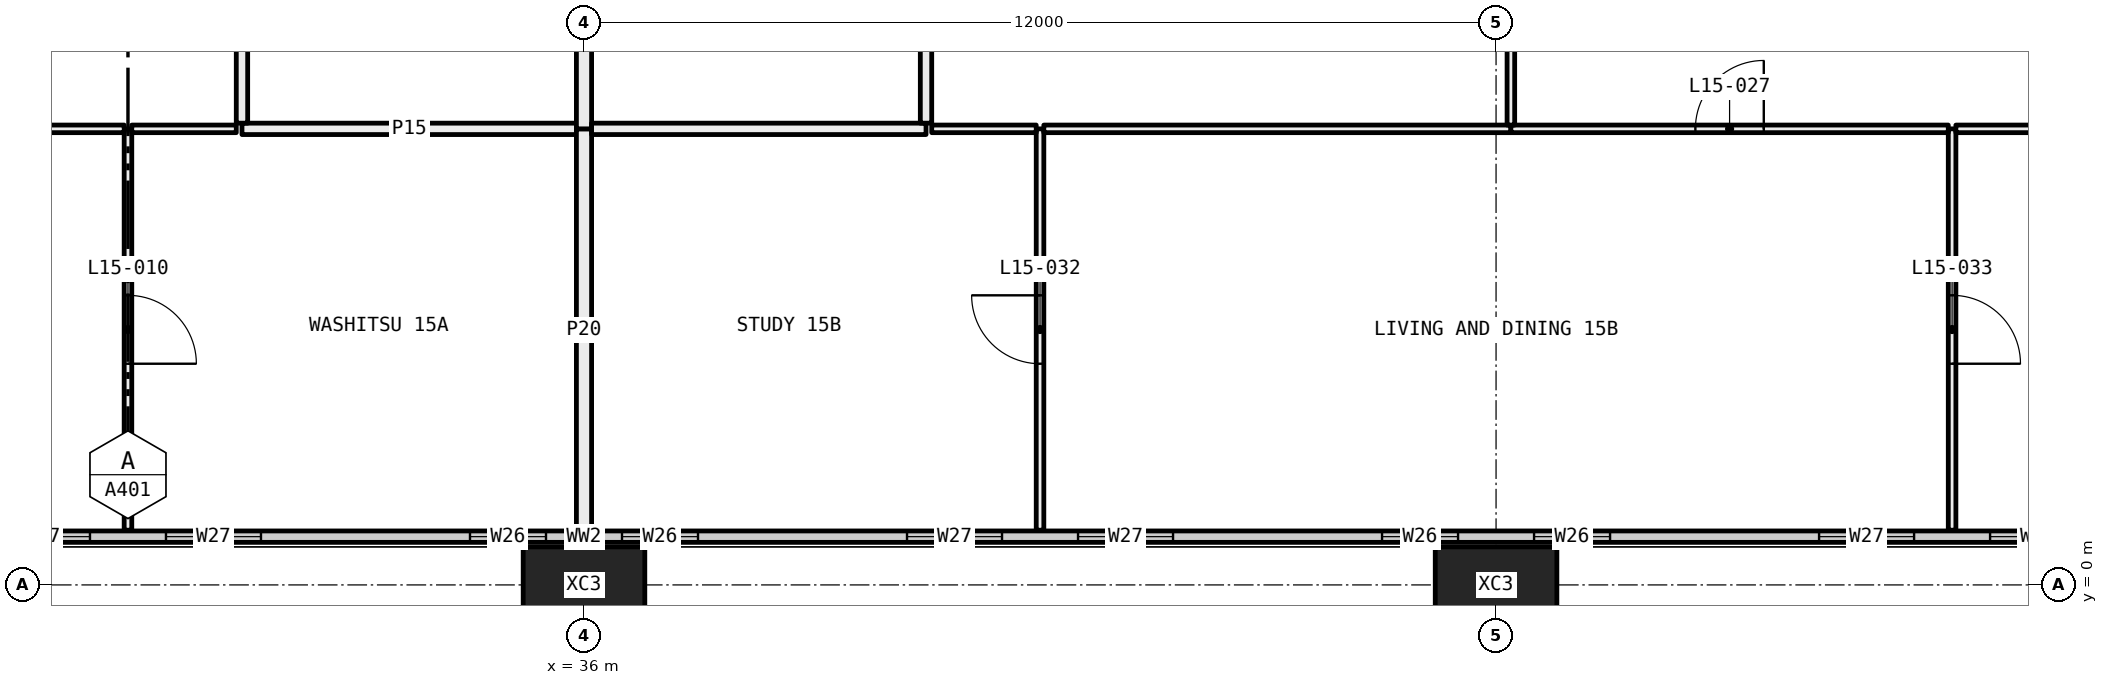
"""IFC4 building model, lengths in metres.
Left out: names, types, materials, properties, quantities, classifications, styles, units other than length and angle.
Written with IfcOpenShell. Run it as: python <this file> out.ifc"""

import sys

from ifc_helpers import new_model, si_unit, direction, frame, frame_2d, origin, origin_2d, place, context, subcontext, project, spatial, rectangle, hollow_rectangle, extrude, element, fill, save


model = new_model("IFC4")
c1 = context("Model", 3, precision=1e-05, world=origin(), true_north=direction((0.0, 1.0)))
c2 = subcontext(c1, "Body", "Model", "MODEL_VIEW")
j1 = project(units=[si_unit("LENGTHUNIT", "METRE"), si_unit("PLANEANGLEUNIT", "RADIAN")], contexts=[c1])
p1 = place(None, origin())
s1 = spatial("IfcSite", under=j1, at=p1, CompositionType="ELEMENT")
p2 = place(p1, origin())
s2 = spatial("IfcBuilding", under=s1, at=p2, CompositionType="ELEMENT")
p3 = place(p2, frame((0.0, 0.0, 64.5)))
s3 = spatial("IfcBuildingStorey", under=s2, at=p3, CompositionType="ELEMENT", Elevation=64.5)
for number, where, z_axis, x_axis in (
    (1, (36.0, 0.0, -0.4), (0.0, 0.0, 1.0), (1.0, 0.0, 0.0)),
    (2, (48.0, 0.0, -0.4), (0.0, 0.0, 1.0), (1.0, 0.0, 0.0)),
):
    element("IfcColumn", number, at=place(p3, frame(where, z_axis=z_axis, x_axis=x_axis)), inside=s3, PredefinedType="COLUMN", context=c2, shape_type="SweptSolid", body=[
        extrude(hollow_rectangle(XDim=1.6, YDim=1.0, WallThickness=0.065, at=origin_2d()), origin(), (0.0, 0.0, 1.0), 3.45),
    ])
p4 = place(p3, frame((6.56, 0.635, 0.0), z_axis=(0.0, 0.0, 1.0), x_axis=(1.0, 0.0, 0.0)))
e3 = element("IfcWall", 3, at=p4, inside=s3, PredefinedType="ELEMENTEDWALL", context=c2, shape_type="SweptSolid", body=[
    extrude(rectangle(XDim=58.88, YDim=0.15, at=frame_2d((29.44, 0.0))), origin(), (0.0, 0.0, 1.0), 3.05),
])
p5 = place(p4, frame((0.44, 0.0, 0.45)))
e4 = element("IfcOpeningElement", 4, at=p5, cuts=e3, PredefinedType="OPENING", context=c2, shape_type="SweptSolid", body=[
    extrude(rectangle(XDim=4.5, YDim=2.55, at=frame_2d((2.25, 1.275))), frame((0.0, 0.085, 0.0), z_axis=(0.0, -1.0, 0.0), x_axis=(1.0, 0.0, 0.0)), (0.0, 0.0, 1.0), 0.17),
])
p6 = place(p4, frame((5.94, 0.0, 0.45)))
e5 = element("IfcOpeningElement", 5, at=p6, cuts=e3, PredefinedType="OPENING", context=c2, shape_type="SweptSolid", body=[
    extrude(rectangle(XDim=1.0, YDim=2.55, at=frame_2d((0.5, 1.275))), frame((0.0, 0.085, 0.0), z_axis=(0.0, -1.0, 0.0), x_axis=(1.0, 0.0, 0.0)), (0.0, 0.0, 1.0), 0.17),
])
p7 = place(p4, frame((9.69, 0.0, 0.45)))
e6 = element("IfcOpeningElement", 6, at=p7, cuts=e3, PredefinedType="OPENING", context=c2, shape_type="SweptSolid", body=[
    extrude(rectangle(XDim=1.25, YDim=2.55, at=frame_2d((0.625, 1.275))), frame((0.0, 0.085, 0.0), z_axis=(0.0, -1.0, 0.0), x_axis=(1.0, 0.0, 0.0)), (0.0, 0.0, 1.0), 0.17),
])
p8 = place(p4, frame((11.94, 0.0, 0.45)))
e7 = element("IfcOpeningElement", 7, at=p8, cuts=e3, PredefinedType="OPENING", context=c2, shape_type="SweptSolid", body=[
    extrude(rectangle(XDim=1.25, YDim=2.55, at=frame_2d((0.625, 1.275))), frame((0.0, 0.085, 0.0), z_axis=(0.0, -1.0, 0.0), x_axis=(1.0, 0.0, 0.0)), (0.0, 0.0, 1.0), 0.17),
])
p9 = place(p4, frame((15.94, 0.0, 0.45)))
e8 = element("IfcOpeningElement", 8, at=p9, cuts=e3, PredefinedType="OPENING", context=c2, shape_type="SweptSolid", body=[
    extrude(rectangle(XDim=1.0, YDim=2.55, at=frame_2d((0.5, 1.275))), frame((0.0, 0.085, 0.0), z_axis=(0.0, -1.0, 0.0), x_axis=(1.0, 0.0, 0.0)), (0.0, 0.0, 1.0), 0.17),
])
p10 = place(p4, frame((17.94, 0.0, 0.45)))
e9 = element("IfcOpeningElement", 9, at=p10, cuts=e3, PredefinedType="OPENING", context=c2, shape_type="SweptSolid", body=[
    extrude(rectangle(XDim=1.0, YDim=2.55, at=frame_2d((0.5, 1.275))), frame((0.0, 0.085, 0.0), z_axis=(0.0, -1.0, 0.0), x_axis=(1.0, 0.0, 0.0)), (0.0, 0.0, 1.0), 0.17),
])
p11 = place(p4, frame((21.69, 0.0, 0.45)))
e10 = element("IfcOpeningElement", 10, at=p11, cuts=e3, PredefinedType="OPENING", context=c2, shape_type="SweptSolid", body=[
    extrude(rectangle(XDim=1.25, YDim=2.55, at=frame_2d((0.625, 1.275))), frame((0.0, 0.085, 0.0), z_axis=(0.0, -1.0, 0.0), x_axis=(1.0, 0.0, 0.0)), (0.0, 0.0, 1.0), 0.17),
])
p12 = place(p4, frame((23.94, 0.0, 0.45)))
e11 = element("IfcOpeningElement", 11, at=p12, cuts=e3, PredefinedType="OPENING", context=c2, shape_type="SweptSolid", body=[
    extrude(rectangle(XDim=1.25, YDim=2.55, at=frame_2d((0.625, 1.275))), frame((0.0, 0.085, 0.0), z_axis=(0.0, -1.0, 0.0), x_axis=(1.0, 0.0, 0.0)), (0.0, 0.0, 1.0), 0.17),
])
p13 = place(p4, frame((27.94, 0.0, 0.45)))
e12 = element("IfcOpeningElement", 12, at=p13, cuts=e3, PredefinedType="OPENING", context=c2, shape_type="SweptSolid", body=[
    extrude(rectangle(XDim=1.0, YDim=2.55, at=frame_2d((0.5, 1.275))), frame((0.0, 0.085, 0.0), z_axis=(0.0, -1.0, 0.0), x_axis=(1.0, 0.0, 0.0)), (0.0, 0.0, 1.0), 0.17),
])
p14 = place(p4, frame((29.94, 0.0, 0.45)))
e13 = element("IfcOpeningElement", 13, at=p14, cuts=e3, PredefinedType="OPENING", context=c2, shape_type="SweptSolid", body=[
    extrude(rectangle(XDim=1.0, YDim=2.55, at=frame_2d((0.5, 1.275))), frame((0.0, 0.085, 0.0), z_axis=(0.0, -1.0, 0.0), x_axis=(1.0, 0.0, 0.0)), (0.0, 0.0, 1.0), 0.17),
])
p15 = place(p4, frame((33.69, 0.0, 0.45)))
e14 = element("IfcOpeningElement", 14, at=p15, cuts=e3, PredefinedType="OPENING", context=c2, shape_type="SweptSolid", body=[
    extrude(rectangle(XDim=1.25, YDim=2.55, at=frame_2d((0.625, 1.275))), frame((0.0, 0.085, 0.0), z_axis=(0.0, -1.0, 0.0), x_axis=(1.0, 0.0, 0.0)), (0.0, 0.0, 1.0), 0.17),
])
p16 = place(p4, frame((35.94, 0.0, 0.45)))
e15 = element("IfcOpeningElement", 15, at=p16, cuts=e3, PredefinedType="OPENING", context=c2, shape_type="SweptSolid", body=[
    extrude(rectangle(XDim=1.25, YDim=2.55, at=frame_2d((0.625, 1.275))), frame((0.0, 0.085, 0.0), z_axis=(0.0, -1.0, 0.0), x_axis=(1.0, 0.0, 0.0)), (0.0, 0.0, 1.0), 0.17),
])
p17 = place(p4, frame((39.94, 0.0, 0.45)))
e16 = element("IfcOpeningElement", 16, at=p17, cuts=e3, PredefinedType="OPENING", context=c2, shape_type="SweptSolid", body=[
    extrude(rectangle(XDim=1.0, YDim=2.55, at=frame_2d((0.5, 1.275))), frame((0.0, 0.085, 0.0), z_axis=(0.0, -1.0, 0.0), x_axis=(1.0, 0.0, 0.0)), (0.0, 0.0, 1.0), 0.17),
])
p18 = place(p4, frame((41.94, 0.0, 0.45)))
e17 = element("IfcOpeningElement", 17, at=p18, cuts=e3, PredefinedType="OPENING", context=c2, shape_type="SweptSolid", body=[
    extrude(rectangle(XDim=1.0, YDim=2.55, at=frame_2d((0.5, 1.275))), frame((0.0, 0.085, 0.0), z_axis=(0.0, -1.0, 0.0), x_axis=(1.0, 0.0, 0.0)), (0.0, 0.0, 1.0), 0.17),
])
p19 = place(p4, frame((45.69, 0.0, 0.45)))
e18 = element("IfcOpeningElement", 18, at=p19, cuts=e3, PredefinedType="OPENING", context=c2, shape_type="SweptSolid", body=[
    extrude(rectangle(XDim=1.25, YDim=2.55, at=frame_2d((0.625, 1.275))), frame((0.0, 0.085, 0.0), z_axis=(0.0, -1.0, 0.0), x_axis=(1.0, 0.0, 0.0)), (0.0, 0.0, 1.0), 0.17),
])
p20 = place(p4, frame((47.94, 0.0, 0.45)))
e19 = element("IfcOpeningElement", 19, at=p20, cuts=e3, PredefinedType="OPENING", context=c2, shape_type="SweptSolid", body=[
    extrude(rectangle(XDim=1.25, YDim=2.55, at=frame_2d((0.625, 1.275))), frame((0.0, 0.085, 0.0), z_axis=(0.0, -1.0, 0.0), x_axis=(1.0, 0.0, 0.0)), (0.0, 0.0, 1.0), 0.17),
])
p21 = place(p4, frame((51.94, 0.0, 0.45)))
e20 = element("IfcOpeningElement", 20, at=p21, cuts=e3, PredefinedType="OPENING", context=c2, shape_type="SweptSolid", body=[
    extrude(rectangle(XDim=1.0, YDim=2.55, at=frame_2d((0.5, 1.275))), frame((0.0, 0.085, 0.0), z_axis=(0.0, -1.0, 0.0), x_axis=(1.0, 0.0, 0.0)), (0.0, 0.0, 1.0), 0.17),
])
p22 = place(p4, frame((53.94, 0.0, 0.45)))
e21 = element("IfcOpeningElement", 21, at=p22, cuts=e3, PredefinedType="OPENING", context=c2, shape_type="SweptSolid", body=[
    extrude(rectangle(XDim=4.5, YDim=2.55, at=frame_2d((2.25, 1.275))), frame((0.0, 0.085, 0.0), z_axis=(0.0, -1.0, 0.0), x_axis=(1.0, 0.0, 0.0)), (0.0, 0.0, 1.0), 0.17),
])
p23 = place(p3, frame((30.0, 0.72, 0.0), z_axis=(0.0, 0.0, 1.0), x_axis=(0.0, 1.0, 0.0)))
e22 = element("IfcWall", 22, at=p23, inside=s3, PredefinedType="PARTITIONING", context=c2, shape_type="SweptSolid", body=[
    extrude(rectangle(XDim=5.28, YDim=0.1, at=frame_2d((2.64, 0.0))), origin(), (0.0, 0.0, 1.0), 3.05),
])
p24 = place(p23, frame((2.19, 0.0, 0.0)))
e23 = element("IfcOpeningElement", 23, at=p24, cuts=e22, PredefinedType="OPENING", context=c2, shape_type="SweptSolid", body=[
    extrude(rectangle(XDim=0.9, YDim=2.1, at=frame_2d((0.45, 1.05))), frame((0.0, 0.06, 0.0), z_axis=(0.0, -1.0, 0.0), x_axis=(1.0, 0.0, 0.0)), (0.0, 0.0, 1.0), 0.12),
])
p25 = place(p3, frame((29.95, 6.0, 0.0), z_axis=(0.0, 0.0, 1.0), x_axis=(-1.0, 0.0, 0.0)))
e24 = element("IfcWall", 24, at=p25, inside=s3, PredefinedType="PARTITIONING", context=c2, shape_type="SweptSolid", body=[
    extrude(rectangle(XDim=6.145, YDim=0.1, at=frame_2d((3.073, 0.0))), origin(), (0.0, 0.0, 1.0), 2.45),
])
p26 = place(p3, frame((31.425, 6.0, 0.0), z_axis=(0.0, 0.0, 1.0), x_axis=(-1.0, 0.0, 0.0)))
e25 = element("IfcWall", 25, at=p26, inside=s3, PredefinedType="PARTITIONING", context=c2, shape_type="SweptSolid", body=[
    extrude(rectangle(XDim=1.375, YDim=0.1, at=frame_2d((0.688, 0.0))), origin(), (0.0, 0.0, 1.0), 3.05),
])
p27 = place(p3, frame((35.9, 6.0, 0.0), z_axis=(0.0, 0.0, 1.0), x_axis=(-1.0, 0.0, 0.0)))
e26 = element("IfcWall", 26, at=p27, inside=s3, PredefinedType="PARTITIONING", context=c2, shape_type="SweptSolid", body=[
    extrude(rectangle(XDim=4.4, YDim=0.15, at=frame_2d((2.2, 0.0))), origin(), (0.0, 0.0, 1.0), 3.05),
])
p28 = place(p3, frame((36.0, 0.72, 0.0), z_axis=(0.0, 0.0, 1.0), x_axis=(0.0, 1.0, 0.0)))
e27 = element("IfcWall", 27, at=p28, inside=s3, PredefinedType="PARTITIONING", context=c2, shape_type="SweptSolid", body=[
    extrude(rectangle(XDim=5.28, YDim=0.2, at=frame_2d((2.64, 0.0))), origin(), (0.0, 0.0, 1.0), 2.45),
])
p29 = place(p3, frame((31.5, 6.075, 0.0), z_axis=(0.0, 0.0, 1.0), x_axis=(0.0, 1.0, 0.0)))
e28 = element("IfcWall", 28, at=p29, inside=s3, PredefinedType="PARTITIONING", context=c2, shape_type="SweptSolid", body=[
    extrude(rectangle(XDim=2.925, YDim=0.15, at=frame_2d((1.462, 0.0))), origin(), (0.0, 0.0, 1.0), 3.05),
])
p30 = place(p29, frame((1.012, 0.0, 0.0)))
e29 = element("IfcOpeningElement", 29, at=p30, cuts=e28, PredefinedType="OPENING", context=c2, shape_type="SweptSolid", body=[
    extrude(rectangle(XDim=0.9, YDim=2.1, at=frame_2d((0.45, 1.05))), frame((0.0, 0.085, 0.0), z_axis=(0.0, -1.0, 0.0), x_axis=(1.0, 0.0, 0.0)), (0.0, 0.0, 1.0), 0.17),
])
p31 = place(p3, frame((36.0, 6.0, 0.0), z_axis=(0.0, 0.0, 1.0), x_axis=(0.0, 1.0, 0.0)))
e30 = element("IfcWall", 30, at=p31, inside=s3, PredefinedType="PARTITIONING", context=c2, shape_type="SweptSolid", body=[
    extrude(rectangle(XDim=3.0, YDim=0.2, at=frame_2d((1.5, 0.0))), origin(), (0.0, 0.0, 1.0), 2.45),
])
p32 = place(p3, frame((42.0, 0.72, 0.0), z_axis=(0.0, 0.0, 1.0), x_axis=(0.0, 1.0, 0.0)))
e31 = element("IfcWall", 31, at=p32, inside=s3, PredefinedType="PARTITIONING", context=c2, shape_type="SweptSolid", body=[
    extrude(rectangle(XDim=5.28, YDim=0.1, at=frame_2d((2.64, 0.0))), origin(), (0.0, 0.0, 1.0), 3.05),
])
p33 = place(p32, frame((2.19, 0.0, 0.0)))
e32 = element("IfcOpeningElement", 32, at=p33, cuts=e31, PredefinedType="OPENING", context=c2, shape_type="SweptSolid", body=[
    extrude(rectangle(XDim=0.9, YDim=2.1, at=frame_2d((0.45, 1.05))), frame((0.0, 0.06, 0.0), z_axis=(0.0, -1.0, 0.0), x_axis=(1.0, 0.0, 0.0)), (0.0, 0.0, 1.0), 0.12),
])
p34 = place(p3, frame((40.5, 6.0, 0.0), z_axis=(0.0, 0.0, 1.0), x_axis=(-1.0, 0.0, 0.0)))
e33 = element("IfcWall", 33, at=p34, inside=s3, PredefinedType="PARTITIONING", context=c2, shape_type="SweptSolid", body=[
    extrude(rectangle(XDim=4.4, YDim=0.15, at=frame_2d((2.2, 0.0))), origin(), (0.0, 0.0, 1.0), 3.05),
])
p35 = place(p3, frame((41.95, 6.0, 0.0), z_axis=(0.0, 0.0, 1.0), x_axis=(-1.0, 0.0, 0.0)))
e34 = element("IfcWall", 34, at=p35, inside=s3, PredefinedType="PARTITIONING", context=c2, shape_type="SweptSolid", body=[
    extrude(rectangle(XDim=1.375, YDim=0.1, at=frame_2d((0.688, 0.0))), origin(), (0.0, 0.0, 1.0), 3.05),
])
p36 = place(p3, frame((54.0, 0.72, 0.0), z_axis=(0.0, 0.0, 1.0), x_axis=(0.0, 1.0, 0.0)))
e35 = element("IfcWall", 35, at=p36, inside=s3, PredefinedType="PARTITIONING", context=c2, shape_type="SweptSolid", body=[
    extrude(rectangle(XDim=5.28, YDim=0.1, at=frame_2d((2.64, 0.0))), origin(), (0.0, 0.0, 1.0), 3.05),
])
p37 = place(p36, frame((2.19, 0.0, 0.0)))
e36 = element("IfcOpeningElement", 36, at=p37, cuts=e35, PredefinedType="OPENING", context=c2, shape_type="SweptSolid", body=[
    extrude(rectangle(XDim=0.9, YDim=2.1, at=frame_2d((0.45, 1.05))), frame((0.0, 0.06, 0.0), z_axis=(0.0, -1.0, 0.0), x_axis=(1.0, 0.0, 0.0)), (0.0, 0.0, 1.0), 0.12),
])
p38 = place(p3, frame((48.195, 6.0, 0.0), z_axis=(0.0, 0.0, 1.0), x_axis=(-1.0, 0.0, 0.0)))
e37 = element("IfcWall", 37, at=p38, inside=s3, PredefinedType="PARTITIONING", context=c2, shape_type="SweptSolid", body=[
    extrude(rectangle(XDim=6.145, YDim=0.1, at=frame_2d((3.073, 0.0))), origin(), (0.0, 0.0, 1.0), 2.45),
])
p39 = place(p3, frame((53.95, 6.0, 0.0), z_axis=(0.0, 0.0, 1.0), x_axis=(-1.0, 0.0, 0.0)))
e38 = element("IfcWall", 38, at=p39, inside=s3, PredefinedType="PARTITIONING", context=c2, shape_type="SweptSolid", body=[
    extrude(rectangle(XDim=5.755, YDim=0.1, at=frame_2d((2.877, 0.0))), origin(), (0.0, 0.0, 1.0), 3.05),
])
p40 = place(p39, frame((2.427, 0.0, 0.0)))
e39 = element("IfcOpeningElement", 39, at=p40, cuts=e38, PredefinedType="OPENING", context=c2, shape_type="SweptSolid", body=[
    extrude(rectangle(XDim=0.9, YDim=2.1, at=frame_2d((0.45, 1.05))), frame((0.0, 0.06, 0.0), z_axis=(0.0, -1.0, 0.0), x_axis=(1.0, 0.0, 0.0)), (0.0, 0.0, 1.0), 0.12),
])
p41 = place(p3, frame((55.89, 6.0, 0.0), z_axis=(0.0, 0.0, 1.0), x_axis=(-1.0, 0.0, 0.0)))
e40 = element("IfcWall", 40, at=p41, inside=s3, PredefinedType="PARTITIONING", context=c2, shape_type="SweptSolid", body=[
    extrude(rectangle(XDim=1.84, YDim=0.1, at=frame_2d((0.92, 0.0))), origin(), (0.0, 0.0, 1.0), 3.05),
])
p42 = place(p3, frame((40.5, 6.075, 0.0), z_axis=(0.0, 0.0, 1.0), x_axis=(0.0, 1.0, 0.0)))
e41 = element("IfcWall", 41, at=p42, inside=s3, PredefinedType="PARTITIONING", context=c2, shape_type="SweptSolid", body=[
    extrude(rectangle(XDim=2.85, YDim=0.15, at=frame_2d((1.425, 0.0))), origin(), (0.0, 0.0, 1.0), 3.05),
])
p43 = place(p42, frame((0.975, 0.0, 0.0)))
e42 = element("IfcOpeningElement", 42, at=p43, cuts=e41, PredefinedType="OPENING", context=c2, shape_type="SweptSolid", body=[
    extrude(rectangle(XDim=0.9, YDim=2.1, at=frame_2d((0.45, 1.05))), frame((0.0, 0.085, 0.0), z_axis=(0.0, -1.0, 0.0), x_axis=(1.0, 0.0, 0.0)), (0.0, 0.0, 1.0), 0.17),
])
p44 = place(p3, frame((48.195, 6.05, 0.0), z_axis=(0.0, 0.0, 1.0), x_axis=(0.0, 1.0, 0.0)))
e43 = element("IfcWall", 43, at=p44, inside=s3, PredefinedType="PARTITIONING", context=c2, shape_type="SweptSolid", body=[
    extrude(rectangle(XDim=5.15, YDim=0.1, at=frame_2d((2.575, 0.0))), origin(), (0.0, 0.0, 1.0), 3.05),
])
p45 = place(p44, frame((2.125, 0.0, 0.0)))
e44 = element("IfcOpeningElement", 44, at=p45, cuts=e43, PredefinedType="OPENING", context=c2, shape_type="SweptSolid", body=[
    extrude(rectangle(XDim=0.9, YDim=2.1, at=frame_2d((0.45, 1.05))), frame((0.0, 0.06, 0.0), z_axis=(0.0, -1.0, 0.0), x_axis=(1.0, 0.0, 0.0)), (0.0, 0.0, 1.0), 0.12),
])
p46 = place(p11, origin())
e45 = element("IfcWindow", 45, at=p46, inside=s3, PartitioningType="SINGLE_PANEL", PredefinedType="WINDOW", context=c2, shape_type="SweptSolid", body=[
    extrude(rectangle(XDim=1.25, YDim=2.55, at=frame_2d((0.625, 1.275))), frame((0.0, 0.03, 0.0), z_axis=(0.0, -1.0, 0.0), x_axis=(1.0, 0.0, 0.0)), (0.0, 0.0, 1.0), 0.06),
])
fill(e10, e45)
p47 = place(p12, origin())
e46 = element("IfcWindow", 46, at=p47, inside=s3, PartitioningType="SINGLE_PANEL", PredefinedType="WINDOW", context=c2, shape_type="SweptSolid", body=[
    extrude(rectangle(XDim=1.25, YDim=2.55, at=frame_2d((0.625, 1.275))), frame((0.0, 0.03, 0.0), z_axis=(0.0, -1.0, 0.0), x_axis=(1.0, 0.0, 0.0)), (0.0, 0.0, 1.0), 0.06),
])
fill(e11, e46)
p48 = place(p13, origin())
e47 = element("IfcWindow", 47, at=p48, inside=s3, PartitioningType="SINGLE_PANEL", PredefinedType="WINDOW", context=c2, shape_type="SweptSolid", body=[
    extrude(rectangle(XDim=1.0, YDim=2.55, at=frame_2d((0.5, 1.275))), frame((0.0, 0.03, 0.0), z_axis=(0.0, -1.0, 0.0), x_axis=(1.0, 0.0, 0.0)), (0.0, 0.0, 1.0), 0.06),
])
fill(e12, e47)
p49 = place(p14, origin())
e48 = element("IfcWindow", 48, at=p49, inside=s3, PartitioningType="SINGLE_PANEL", PredefinedType="WINDOW", context=c2, shape_type="SweptSolid", body=[
    extrude(rectangle(XDim=1.0, YDim=2.55, at=frame_2d((0.5, 1.275))), frame((0.0, 0.03, 0.0), z_axis=(0.0, -1.0, 0.0), x_axis=(1.0, 0.0, 0.0)), (0.0, 0.0, 1.0), 0.06),
])
fill(e13, e48)
p50 = place(p15, origin())
e49 = element("IfcWindow", 49, at=p50, inside=s3, PartitioningType="SINGLE_PANEL", PredefinedType="WINDOW", context=c2, shape_type="SweptSolid", body=[
    extrude(rectangle(XDim=1.25, YDim=2.55, at=frame_2d((0.625, 1.275))), frame((0.0, 0.03, 0.0), z_axis=(0.0, -1.0, 0.0), x_axis=(1.0, 0.0, 0.0)), (0.0, 0.0, 1.0), 0.06),
])
fill(e14, e49)
p51 = place(p16, origin())
e50 = element("IfcWindow", 50, at=p51, inside=s3, PartitioningType="SINGLE_PANEL", PredefinedType="WINDOW", context=c2, shape_type="SweptSolid", body=[
    extrude(rectangle(XDim=1.25, YDim=2.55, at=frame_2d((0.625, 1.275))), frame((0.0, 0.03, 0.0), z_axis=(0.0, -1.0, 0.0), x_axis=(1.0, 0.0, 0.0)), (0.0, 0.0, 1.0), 0.06),
])
fill(e15, e50)
p52 = place(p17, origin())
e51 = element("IfcWindow", 51, at=p52, inside=s3, PartitioningType="SINGLE_PANEL", PredefinedType="WINDOW", context=c2, shape_type="SweptSolid", body=[
    extrude(rectangle(XDim=1.0, YDim=2.55, at=frame_2d((0.5, 1.275))), frame((0.0, 0.03, 0.0), z_axis=(0.0, -1.0, 0.0), x_axis=(1.0, 0.0, 0.0)), (0.0, 0.0, 1.0), 0.06),
])
fill(e16, e51)
p53 = place(p18, origin())
e52 = element("IfcWindow", 52, at=p53, inside=s3, PartitioningType="SINGLE_PANEL", PredefinedType="WINDOW", context=c2, shape_type="SweptSolid", body=[
    extrude(rectangle(XDim=1.0, YDim=2.55, at=frame_2d((0.5, 1.275))), frame((0.0, 0.03, 0.0), z_axis=(0.0, -1.0, 0.0), x_axis=(1.0, 0.0, 0.0)), (0.0, 0.0, 1.0), 0.06),
])
fill(e17, e52)
p54 = place(p19, origin())
e53 = element("IfcWindow", 53, at=p54, inside=s3, PartitioningType="SINGLE_PANEL", PredefinedType="WINDOW", context=c2, shape_type="SweptSolid", body=[
    extrude(rectangle(XDim=1.25, YDim=2.55, at=frame_2d((0.625, 1.275))), frame((0.0, 0.03, 0.0), z_axis=(0.0, -1.0, 0.0), x_axis=(1.0, 0.0, 0.0)), (0.0, 0.0, 1.0), 0.06),
])
fill(e18, e53)
p55 = place(p20, origin())
e54 = element("IfcWindow", 54, at=p55, inside=s3, PartitioningType="SINGLE_PANEL", PredefinedType="WINDOW", context=c2, shape_type="SweptSolid", body=[
    extrude(rectangle(XDim=1.25, YDim=2.55, at=frame_2d((0.625, 1.275))), frame((0.0, 0.03, 0.0), z_axis=(0.0, -1.0, 0.0), x_axis=(1.0, 0.0, 0.0)), (0.0, 0.0, 1.0), 0.06),
])
fill(e19, e54)
p56 = place(p24, frame((0.9, 0.0, 0.0), x_axis=(-1.0, 0.0, 0.0)))
e55 = element("IfcDoor", 55, at=p56, inside=s3, OperationType="SINGLE_SWING_LEFT", PredefinedType="DOOR", context=c2, shape_type="SweptSolid", body=[
    extrude(rectangle(XDim=0.9, YDim=2.1, at=frame_2d((0.45, 1.05))), frame((0.0, 0.025, 0.0), z_axis=(0.0, -1.0, 0.0), x_axis=(1.0, 0.0, 0.0)), (0.0, 0.0, 1.0), 0.05),
])
fill(e23, e55)
p57 = place(p40, frame((0.9, 0.0, 0.0), x_axis=(-1.0, 0.0, 0.0)))
e56 = element("IfcDoor", 56, at=p57, inside=s3, OperationType="SINGLE_SWING_LEFT", PredefinedType="DOOR", context=c2, shape_type="SweptSolid", body=[
    extrude(rectangle(XDim=0.9, YDim=2.1, at=frame_2d((0.45, 1.05))), frame((0.0, 0.025, 0.0), z_axis=(0.0, -1.0, 0.0), x_axis=(1.0, 0.0, 0.0)), (0.0, 0.0, 1.0), 0.05),
])
fill(e39, e56)
p58 = place(p33, origin())
e57 = element("IfcDoor", 57, at=p58, inside=s3, OperationType="SINGLE_SWING_LEFT", PredefinedType="DOOR", context=c2, shape_type="SweptSolid", body=[
    extrude(rectangle(XDim=0.9, YDim=2.1, at=frame_2d((0.45, 1.05))), frame((0.0, 0.025, 0.0), z_axis=(0.0, -1.0, 0.0), x_axis=(1.0, 0.0, 0.0)), (0.0, 0.0, 1.0), 0.05),
])
fill(e32, e57)
p59 = place(p37, frame((0.9, 0.0, 0.0), x_axis=(-1.0, 0.0, 0.0)))
e58 = element("IfcDoor", 58, at=p59, inside=s3, OperationType="SINGLE_SWING_LEFT", PredefinedType="DOOR", context=c2, shape_type="SweptSolid", body=[
    extrude(rectangle(XDim=0.9, YDim=2.1, at=frame_2d((0.45, 1.05))), frame((0.0, 0.025, 0.0), z_axis=(0.0, -1.0, 0.0), x_axis=(1.0, 0.0, 0.0)), (0.0, 0.0, 1.0), 0.05),
])
fill(e36, e58)
save(model, sys.argv[1])
